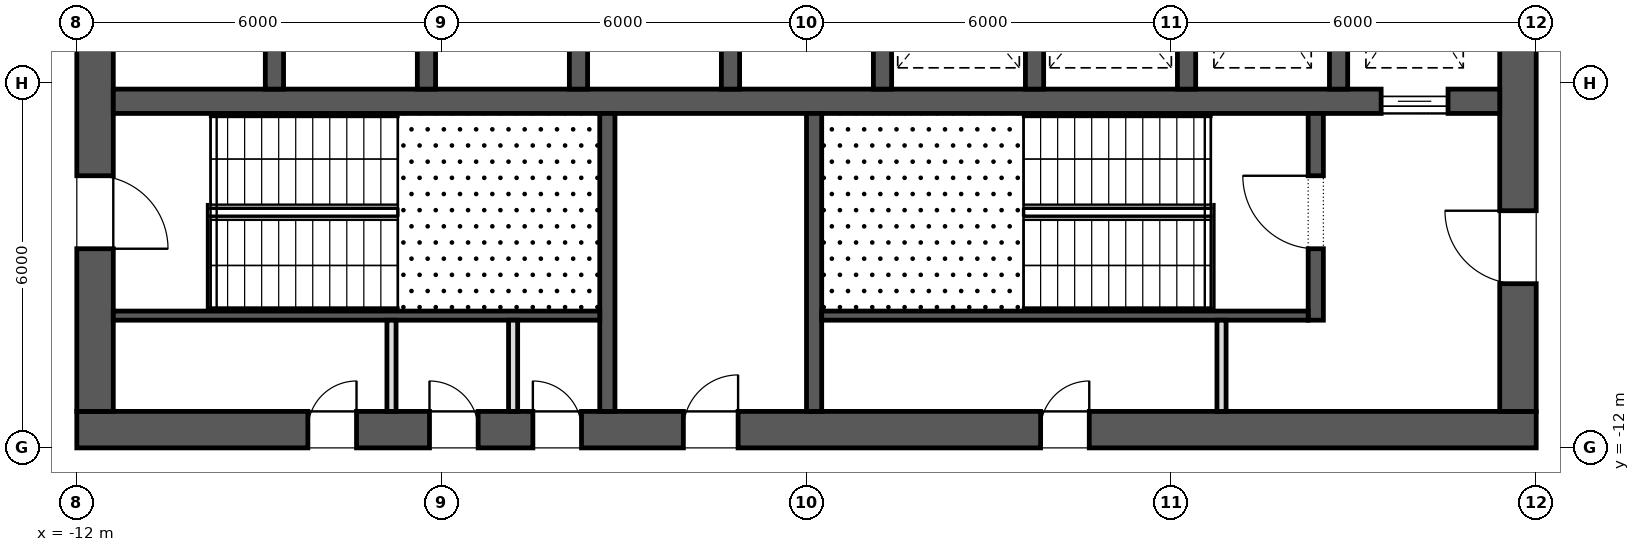
"""IFC4 building model, lengths in metres.
Left out: names, types, materials, properties, quantities, classifications, styles, units other than length and angle.
Written with IfcOpenShell. Run it as: python <this file> out.ifc"""

import sys

from ifc_helpers import new_model, si_unit, direction, frame, frame_2d, origin, place, context, subcontext, project, spatial, rectangle, extrude, element, fill, save


model = new_model("IFC4")
c1 = context("Model", 3, precision=1e-05, world=origin(), true_north=direction((0.0, 1.0)))
c2 = subcontext(c1, "Body", "Model", "MODEL_VIEW")
j1 = project(units=[si_unit("LENGTHUNIT", "METRE"), si_unit("PLANEANGLEUNIT", "RADIAN")], contexts=[c1])
p1 = place(None, origin())
s1 = spatial("IfcSite", under=j1, at=p1, CompositionType="ELEMENT")
p2 = place(p1, origin())
s2 = spatial("IfcBuilding", under=s1, at=p2, CompositionType="ELEMENT")
p3 = place(p2, frame((0.0, 0.0, 44.5)))
s3 = spatial("IfcBuildingStorey", under=s2, at=p3, CompositionType="ELEMENT", Elevation=44.5)
p4 = place(p3, frame((-12.0, -11.7, 0.0), z_axis=(0.0, 0.0, 1.0), x_axis=(1.0, 0.0, 0.0)))
e1 = element("IfcWall", 1, at=p4, inside=s3, PredefinedType="SHEAR", context=c2, shape_type="SweptSolid", body=[
    extrude(rectangle(XDim=24.0, YDim=0.6, at=frame_2d((12.0, 0.0))), origin(), (0.0, 0.0, 1.0), 4.2),
])
p5 = place(p4, frame((9.975, 0.0, 0.0)))
e2 = element("IfcOpeningElement", 2, at=p5, cuts=e1, PredefinedType="OPENING", context=c2, shape_type="SweptSolid", body=[
    extrude(rectangle(XDim=0.9, YDim=2.1, at=frame_2d((0.45, 1.05))), frame((0.0, 0.312, 0.0), z_axis=(0.0, -1.0, 0.0), x_axis=(1.0, 0.0, 0.0)), (0.0, 0.0, 1.0), 0.624),
])
p6 = place(p4, frame((3.8, 0.0, 0.0)))
e3 = element("IfcOpeningElement", 3, at=p6, cuts=e1, PredefinedType="OPENING", context=c2, shape_type="SweptSolid", body=[
    extrude(rectangle(XDim=0.8, YDim=2.1, at=frame_2d((0.4, 1.05))), frame((0.0, 0.312, 0.0), z_axis=(0.0, -1.0, 0.0), x_axis=(1.0, 0.0, 0.0)), (0.0, 0.0, 1.0), 0.624),
])
p7 = place(p4, frame((5.8, 0.0, 0.0)))
e4 = element("IfcOpeningElement", 4, at=p7, cuts=e1, PredefinedType="OPENING", context=c2, shape_type="SweptSolid", body=[
    extrude(rectangle(XDim=0.8, YDim=2.1, at=frame_2d((0.4, 1.05))), frame((0.0, 0.312, 0.0), z_axis=(0.0, -1.0, 0.0), x_axis=(1.0, 0.0, 0.0)), (0.0, 0.0, 1.0), 0.624),
])
p8 = place(p4, frame((7.5, 0.0, 0.0)))
e5 = element("IfcOpeningElement", 5, at=p8, cuts=e1, PredefinedType="OPENING", context=c2, shape_type="SweptSolid", body=[
    extrude(rectangle(XDim=0.8, YDim=2.1, at=frame_2d((0.4, 1.05))), frame((0.0, 0.312, 0.0), z_axis=(0.0, -1.0, 0.0), x_axis=(1.0, 0.0, 0.0)), (0.0, 0.0, 1.0), 0.624),
])
p9 = place(p4, frame((15.85, 0.0, 0.0)))
e6 = element("IfcOpeningElement", 6, at=p9, cuts=e1, PredefinedType="OPENING", context=c2, shape_type="SweptSolid", body=[
    extrude(rectangle(XDim=0.8, YDim=2.1, at=frame_2d((0.4, 1.05))), frame((0.0, 0.312, 0.0), z_axis=(0.0, -1.0, 0.0), x_axis=(1.0, 0.0, 0.0)), (0.0, 0.0, 1.0), 0.624),
])
p10 = place(p3, frame((11.7, -11.4, 0.0), z_axis=(0.0, 0.0, 1.0), x_axis=(0.0, 1.0, 0.0)))
e7 = element("IfcWall", 7, at=p10, inside=s3, PredefinedType="SHEAR", context=c2, shape_type="SweptSolid", body=[
    extrude(rectangle(XDim=22.8, YDim=0.6, at=frame_2d((11.4, 0.0))), origin(), (0.0, 0.0, 1.0), 4.2),
])
p11 = place(p10, frame((10.2, 0.0, 0.0)))
e8 = element("IfcOpeningElement", 8, at=p11, cuts=e7, PredefinedType="OPENING", context=c2, shape_type="SweptSolid", body=[
    extrude(rectangle(XDim=2.4, YDim=2.1, at=frame_2d((1.2, 1.05))), frame((0.0, 0.312, 0.0), z_axis=(0.0, -1.0, 0.0), x_axis=(1.0, 0.0, 0.0)), (0.0, 0.0, 1.0), 0.624),
])
p12 = place(p10, frame((19.5, 0.0, 0.0)))
e9 = element("IfcOpeningElement", 9, at=p12, cuts=e7, PredefinedType="OPENING", context=c2, shape_type="SweptSolid", body=[
    extrude(rectangle(XDim=1.2, YDim=2.1, at=frame_2d((0.6, 1.05))), frame((0.0, 0.312, 0.0), z_axis=(0.0, -1.0, 0.0), x_axis=(1.0, 0.0, 0.0)), (0.0, 0.0, 1.0), 0.624),
])
p13 = place(p10, frame((2.1, 0.0, 0.0)))
e10 = element("IfcOpeningElement", 10, at=p13, cuts=e7, PredefinedType="OPENING", context=c2, shape_type="SweptSolid", body=[
    extrude(rectangle(XDim=1.2, YDim=2.1, at=frame_2d((0.6, 1.05))), frame((0.0, 0.312, 0.0), z_axis=(0.0, -1.0, 0.0), x_axis=(1.0, 0.0, 0.0)), (0.0, 0.0, 1.0), 0.624),
])
p14 = place(p3, frame((-11.7, -11.4, 0.0), z_axis=(0.0, 0.0, 1.0), x_axis=(0.0, 1.0, 0.0)))
e11 = element("IfcWall", 11, at=p14, inside=s3, PredefinedType="SHEAR", context=c2, shape_type="SweptSolid", body=[
    extrude(rectangle(XDim=22.8, YDim=0.6, at=frame_2d((11.4, 0.0))), origin(), (0.0, 0.0, 1.0), 4.2),
])
p15 = place(p14, frame((10.2, 0.0, 0.0)))
e12 = element("IfcOpeningElement", 12, at=p15, cuts=e11, PredefinedType="OPENING", context=c2, shape_type="SweptSolid", body=[
    extrude(rectangle(XDim=2.4, YDim=2.1, at=frame_2d((1.2, 1.05))), frame((0.0, 0.312, 0.0), z_axis=(0.0, -1.0, 0.0), x_axis=(1.0, 0.0, 0.0)), (0.0, 0.0, 1.0), 0.624),
])
p16 = place(p14, frame((18.925, 0.0, 0.0)))
e13 = element("IfcOpeningElement", 13, at=p16, cuts=e11, PredefinedType="OPENING", context=c2, shape_type="SweptSolid", body=[
    extrude(rectangle(XDim=1.2, YDim=2.1, at=frame_2d((0.6, 1.05))), frame((0.0, 0.312, 0.0), z_axis=(0.0, -1.0, 0.0), x_axis=(1.0, 0.0, 0.0)), (0.0, 0.0, 1.0), 0.624),
])
p17 = place(p14, frame((2.675, 0.0, 0.0)))
e14 = element("IfcOpeningElement", 14, at=p17, cuts=e11, PredefinedType="OPENING", context=c2, shape_type="SweptSolid", body=[
    extrude(rectangle(XDim=1.2, YDim=2.1, at=frame_2d((0.6, 1.05))), frame((0.0, 0.312, 0.0), z_axis=(0.0, -1.0, 0.0), x_axis=(1.0, 0.0, 0.0)), (0.0, 0.0, 1.0), 0.624),
])
p18 = place(p3, frame((-11.4, -6.3, 0.0), z_axis=(0.0, 0.0, 1.0), x_axis=(1.0, 0.0, 0.0)))
e15 = element("IfcWall", 15, at=p18, inside=s3, PredefinedType="SHEAR", context=c2, shape_type="SweptSolid", body=[
    extrude(rectangle(XDim=22.8, YDim=0.4, at=frame_2d((11.4, 0.0))), origin(), (0.0, 0.0, 1.0), 4.2),
])
p19 = place(p18, frame((20.85, 0.0, 0.0)))
e16 = element("IfcOpeningElement", 16, at=p19, cuts=e15, PredefinedType="OPENING", context=c2, shape_type="SweptSolid", body=[
    extrude(rectangle(XDim=1.1, YDim=2.1, at=frame_2d((0.55, 1.05))), frame((0.0, 0.212, 0.0), z_axis=(0.0, -1.0, 0.0), x_axis=(1.0, 0.0, 0.0)), (0.0, 0.0, 1.0), 0.424),
])
for number, where, z_axis, x_axis in (
    (17, (-8.75, -6.1, 0.0), (0.0, 0.0, 1.0), (0.0, 1.0, 0.0)),
    (18, (-6.25, -6.1, 0.0), (0.0, 0.0, 1.0), (0.0, 1.0, 0.0)),
    (19, (-3.75, -6.1, 0.0), (0.0, 0.0, 1.0), (0.0, 1.0, 0.0)),
    (20, (-1.25, -6.1, 0.0), (0.0, 0.0, 1.0), (0.0, 1.0, 0.0)),
    (21, (1.25, -6.1, 0.0), (0.0, 0.0, 1.0), (0.0, 1.0, 0.0)),
    (22, (3.75, -6.1, 0.0), (0.0, 0.0, 1.0), (0.0, 1.0, 0.0)),
    (23, (6.25, -6.1, 0.0), (0.0, 0.0, 1.0), (0.0, 1.0, 0.0)),
    (24, (8.75, -6.1, 0.0), (0.0, 0.0, 1.0), (0.0, 1.0, 0.0)),
):
    element("IfcWall", number, at=place(p3, frame(where, z_axis=z_axis, x_axis=x_axis)), inside=s3, PredefinedType="SHEAR", context=c2, shape_type="SweptSolid", body=[
        extrude(rectangle(XDim=2.9, YDim=0.3, at=frame_2d((1.45, 0.0))), origin(), (0.0, 0.0, 1.0), 4.2),
    ])
for number, where, z_axis, x_axis in (
    (25, (-3.275, -11.4, 0.0), (0.0, 0.0, 1.0), (0.0, 1.0, 0.0)),
    (26, (0.125, -11.4, 0.0), (0.0, 0.0, 1.0), (0.0, 1.0, 0.0)),
):
    element("IfcWall", number, at=place(p3, frame(where, z_axis=z_axis, x_axis=x_axis)), inside=s3, PredefinedType="SHEAR", context=c2, shape_type="SweptSolid", body=[
        extrude(rectangle(XDim=4.9, YDim=0.25, at=frame_2d((2.45, 0.0))), origin(), (0.0, 0.0, 1.0), 3.9),
    ])
p20 = place(p3, frame((8.375, -9.9, 0.0), z_axis=(0.0, 0.0, 1.0), x_axis=(0.0, 1.0, 0.0)))
e27 = element("IfcWall", 27, at=p20, inside=s3, PredefinedType="SHEAR", context=c2, shape_type="SweptSolid", body=[
    extrude(rectangle(XDim=3.4, YDim=0.25, at=frame_2d((1.7, 0.0))), origin(), (0.0, 0.0, 1.0), 3.9),
])
p21 = place(p20, frame((1.175, 0.0, 0.0)))
e28 = element("IfcOpeningElement", 28, at=p21, cuts=e27, PredefinedType="OPENING", context=c2, shape_type="SweptSolid", body=[
    extrude(rectangle(XDim=1.2, YDim=2.1, at=frame_2d((0.6, 1.05))), frame((0.0, 0.137, 0.0), z_axis=(0.0, -1.0, 0.0), x_axis=(1.0, 0.0, 0.0)), (0.0, 0.0, 1.0), 0.274),
])
for number, where, z_axis, x_axis in (
    (29, (-11.4, -9.825, 0.0), (0.0, 0.0, 1.0), (1.0, 0.0, 0.0)),
    (30, (0.25, -9.825, 0.0), (0.0, 0.0, 1.0), (1.0, 0.0, 0.0)),
):
    element("IfcWall", number, at=place(p3, frame(where, z_axis=z_axis, x_axis=x_axis)), inside=s3, PredefinedType="SHEAR", context=c2, shape_type="SweptSolid", body=[
        extrude(rectangle(XDim=8.0, YDim=0.15, at=frame_2d((4.0, 0.0))), origin(), (0.0, 0.0, 1.0), 3.9),
    ])
for number, where, z_axis, x_axis in (
    (31, (-6.825, -11.4, 0.0), (0.0, 0.0, 1.0), (0.0, 1.0, 0.0)),
    (32, (-4.825, -11.4, 0.0), (0.0, 0.0, 1.0), (0.0, 1.0, 0.0)),
    (33, (6.825, -11.4, 0.0), (0.0, 0.0, 1.0), (0.0, 1.0, 0.0)),
):
    element("IfcWall", number, at=place(p3, frame(where, z_axis=z_axis, x_axis=x_axis)), inside=s3, PredefinedType="PARTITIONING", context=c2, shape_type="SweptSolid", body=[
        extrude(rectangle(XDim=1.5, YDim=0.15, at=frame_2d((0.75, 0.0))), origin(), (0.0, 0.0, 1.0), 3.9),
    ])
p22 = place(p19, origin())
e34 = element("IfcDoor", 34, at=p22, inside=s3, OperationType="SLIDING_TO_LEFT", PredefinedType="DOOR", context=c2, shape_type="SweptSolid", body=[
    extrude(rectangle(XDim=1.1, YDim=2.1, at=frame_2d((0.55, 1.05))), frame((0.0, 0.025, 0.0), z_axis=(0.0, -1.0, 0.0), x_axis=(1.0, 0.0, 0.0)), (0.0, 0.0, 1.0), 0.05),
])
fill(e16, e34)
p23 = place(p17, frame((1.2, 0.0, 0.0), z_axis=(0.0, 0.0, 1.0), x_axis=(-1.0, 0.0, 0.0)))
e35 = element("IfcDoor", 35, at=p23, inside=s3, OperationType="SINGLE_SWING_LEFT", PredefinedType="DOOR", context=c2, shape_type="SweptSolid", body=[
    extrude(rectangle(XDim=1.2, YDim=2.1, at=frame_2d((0.6, 1.05))), frame((0.0, 0.025, 0.0), z_axis=(0.0, -1.0, 0.0), x_axis=(1.0, 0.0, 0.0)), (0.0, 0.0, 1.0), 0.05),
])
fill(e14, e35)
p24 = place(p21, origin())
e36 = element("IfcDoor", 36, at=p24, inside=s3, OperationType="SINGLE_SWING_LEFT", PredefinedType="DOOR", context=c2, shape_type="SweptSolid", body=[
    extrude(rectangle(XDim=1.2, YDim=2.1, at=frame_2d((0.6, 1.05))), frame((0.0, 0.025, 0.0), z_axis=(0.0, -1.0, 0.0), x_axis=(1.0, 0.0, 0.0)), (0.0, 0.0, 1.0), 0.05),
])
fill(e28, e36)
p25 = place(p13, origin())
e37 = element("IfcDoor", 37, at=p25, inside=s3, OperationType="SINGLE_SWING_LEFT", PredefinedType="DOOR", context=c2, shape_type="SweptSolid", body=[
    extrude(rectangle(XDim=1.2, YDim=2.1, at=frame_2d((0.6, 1.05))), frame((0.0, 0.025, 0.0), z_axis=(0.0, -1.0, 0.0), x_axis=(1.0, 0.0, 0.0)), (0.0, 0.0, 1.0), 0.05),
])
fill(e10, e37)
p26 = place(p5, origin())
e38 = element("IfcDoor", 38, at=p26, inside=s3, OperationType="SINGLE_SWING_LEFT", PredefinedType="DOOR", context=c2, shape_type="SweptSolid", body=[
    extrude(rectangle(XDim=0.9, YDim=2.1, at=frame_2d((0.45, 1.05))), frame((0.0, 0.025, 0.0), z_axis=(0.0, -1.0, 0.0), x_axis=(1.0, 0.0, 0.0)), (0.0, 0.0, 1.0), 0.05),
])
fill(e2, e38)
p27 = place(p6, origin())
e39 = element("IfcDoor", 39, at=p27, inside=s3, OperationType="SINGLE_SWING_LEFT", PredefinedType="DOOR", context=c2, shape_type="SweptSolid", body=[
    extrude(rectangle(XDim=0.8, YDim=2.1, at=frame_2d((0.4, 1.05))), frame((0.0, 0.025, 0.0), z_axis=(0.0, -1.0, 0.0), x_axis=(1.0, 0.0, 0.0)), (0.0, 0.0, 1.0), 0.05),
])
fill(e3, e39)
p28 = place(p7, origin())
e40 = element("IfcDoor", 40, at=p28, inside=s3, OperationType="SINGLE_SWING_RIGHT", PredefinedType="DOOR", context=c2, shape_type="SweptSolid", body=[
    extrude(rectangle(XDim=0.8, YDim=2.1, at=frame_2d((0.4, 1.05))), frame((0.0, 0.025, 0.0), z_axis=(0.0, -1.0, 0.0), x_axis=(1.0, 0.0, 0.0)), (0.0, 0.0, 1.0), 0.05),
])
fill(e4, e40)
p29 = place(p8, origin())
e41 = element("IfcDoor", 41, at=p29, inside=s3, OperationType="SINGLE_SWING_RIGHT", PredefinedType="DOOR", context=c2, shape_type="SweptSolid", body=[
    extrude(rectangle(XDim=0.8, YDim=2.1, at=frame_2d((0.4, 1.05))), frame((0.0, 0.025, 0.0), z_axis=(0.0, -1.0, 0.0), x_axis=(1.0, 0.0, 0.0)), (0.0, 0.0, 1.0), 0.05),
])
fill(e5, e41)
p30 = place(p9, origin())
e42 = element("IfcDoor", 42, at=p30, inside=s3, OperationType="SINGLE_SWING_LEFT", PredefinedType="DOOR", context=c2, shape_type="SweptSolid", body=[
    extrude(rectangle(XDim=0.8, YDim=2.1, at=frame_2d((0.4, 1.05))), frame((0.0, 0.025, 0.0), z_axis=(0.0, -1.0, 0.0), x_axis=(1.0, 0.0, 0.0)), (0.0, 0.0, 1.0), 0.05),
])
fill(e6, e42)
save(model, sys.argv[1])
